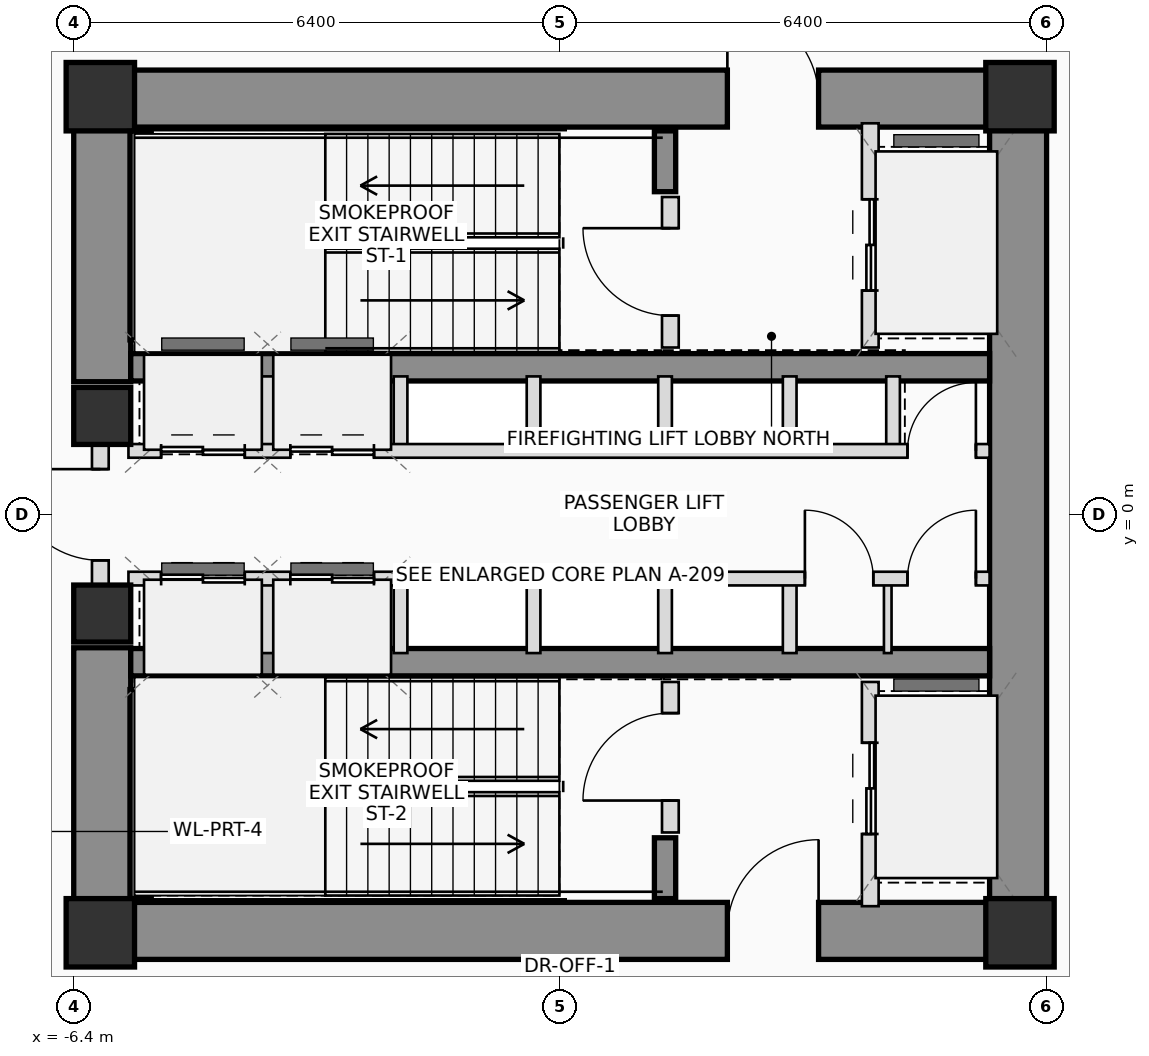
"""IFC4 building model, lengths in metres.
Left out: names, types, materials, properties, quantities, classifications, styles, units other than length and angle.
Written with IfcOpenShell. Run it as: python <this file> out.ifc"""

import sys

from ifc_helpers import new_model, si_unit, direction, frame, frame_2d, origin, origin_2d, place, context, subcontext, project, spatial, rectangle, extrude, source, transform, mapped, element, fill, save


model = new_model("IFC4")
c1 = context("Model", 3, precision=1e-05, world=origin(), true_north=direction((0.0, 1.0)))
c2 = subcontext(c1, "Body", "Model", "MODEL_VIEW")
j1 = project(units=[si_unit("LENGTHUNIT", "METRE"), si_unit("PLANEANGLEUNIT", "RADIAN")], contexts=[c1])
p1 = place(None, origin())
s1 = spatial("IfcSite", under=j1, at=p1, CompositionType="ELEMENT")
p2 = place(p1, origin())
s2 = spatial("IfcBuilding", under=s1, at=p2, CompositionType="ELEMENT")
p3 = place(p2, frame((0.0, 0.0, 97.4)))
s3 = spatial("IfcBuildingStorey", under=s2, at=p3, CompositionType="ELEMENT", Elevation=97.4)
m1 = source(origin(), c2, "Body", "SweptSolid", [
    extrude(rectangle(XDim=0.9, YDim=0.9, at=origin_2d()), origin(), (0.0, 0.0, 1.0), 3.75),
])
for number, where, z_axis, x_axis in (
    (1, (-6.05, -5.5, 0.0), (0.0, 0.0, 1.0), (1.0, 0.0, 0.0)),
    (2, (6.05, -5.5, 0.0), (0.0, 0.0, 1.0), (1.0, 0.0, 0.0)),
    (3, (6.05, 5.5, 0.0), (0.0, 0.0, 1.0), (1.0, 0.0, 0.0)),
    (4, (-6.05, 5.5, 0.0), (0.0, 0.0, 1.0), (1.0, 0.0, 0.0)),
):
    element("IfcColumn", number, at=place(p3, frame(where, z_axis=z_axis, x_axis=x_axis)), inside=s3, PredefinedType="COLUMN", context=c2, shape_type="MappedRepresentation", body=[
        mapped(m1, transform((0.0, 0.0, 0.0), scale=1.0)),
    ])
p4 = place(p3, frame((-6.4, 5.475, 0.0), z_axis=(0.0, 0.0, 1.0), x_axis=(1.0, 0.0, 0.0)))
e5 = element("IfcWall", 5, at=p4, inside=s3, PredefinedType="SHEAR", context=c2, shape_type="SweptSolid", body=[
    extrude(rectangle(XDim=12.8, YDim=0.75, at=frame_2d((6.4, 0.0))), origin(), (0.0, 0.0, 1.0), 3.75),
])
p5 = place(p4, frame((8.6, 0.0, 0.0)))
e6 = element("IfcOpeningElement", 6, at=p5, cuts=e5, PredefinedType="OPENING", context=c2, shape_type="SweptSolid", body=[
    extrude(rectangle(XDim=1.2, YDim=2.2, at=frame_2d((0.6, 1.1))), frame((0.0, 0.385, 0.0), z_axis=(0.0, -1.0, 0.0), x_axis=(1.0, 0.0, 0.0)), (0.0, 0.0, 1.0), 0.77),
])
p6 = place(p3, frame((-6.4, -5.475, 0.0), z_axis=(0.0, 0.0, 1.0), x_axis=(1.0, 0.0, 0.0)))
e7 = element("IfcWall", 7, at=p6, inside=s3, PredefinedType="SHEAR", context=c2, shape_type="SweptSolid", body=[
    extrude(rectangle(XDim=12.8, YDim=0.75, at=frame_2d((6.4, 0.0))), origin(), (0.0, 0.0, 1.0), 3.75),
])
p7 = place(p6, frame((8.6, 0.0, 0.0)))
e8 = element("IfcOpeningElement", 8, at=p7, cuts=e7, PredefinedType="OPENING", context=c2, shape_type="SweptSolid", body=[
    extrude(rectangle(XDim=1.2, YDim=2.2, at=frame_2d((0.6, 1.1))), frame((0.0, 0.385, 0.0), z_axis=(0.0, -1.0, 0.0), x_axis=(1.0, 0.0, 0.0)), (0.0, 0.0, 1.0), 0.77),
])
p8 = place(p3, frame((6.025, -5.1, 0.0), z_axis=(0.0, 0.0, 1.0), x_axis=(0.0, 1.0, 0.0)))
e9 = element("IfcWall", 9, at=p8, inside=s3, PredefinedType="SHEAR", context=c2, shape_type="SweptSolid", body=[
    extrude(rectangle(XDim=10.2, YDim=0.75, at=frame_2d((5.1, 0.0))), origin(), (0.0, 0.0, 1.0), 3.75),
])
for number, where, z_axis, x_axis in (
    (10, (-6.025, -5.1, 0.0), (0.0, 0.0, 1.0), (0.0, 1.0, 0.0)),
    (11, (-6.025, 1.75, 0.0), (0.0, 0.0, 1.0), (0.0, 1.0, 0.0)),
):
    element("IfcWall", number, at=place(p3, frame(where, z_axis=z_axis, x_axis=x_axis)), inside=s3, PredefinedType="SHEAR", context=c2, shape_type="SweptSolid", body=[
        extrude(rectangle(XDim=3.35, YDim=0.75, at=frame_2d((1.675, 0.0))), origin(), (0.0, 0.0, 1.0), 3.75),
    ])
for number, where, z_axis, x_axis in (
    (12, (-5.65, 1.94, 0.0), (0.0, 0.0, 1.0), (1.0, 0.0, 0.0)),
    (13, (-5.65, -1.94, 0.0), (0.0, 0.0, 1.0), (1.0, 0.0, 0.0)),
):
    element("IfcWall", number, at=place(p3, frame(where, z_axis=z_axis, x_axis=x_axis)), inside=s3, PredefinedType="SHEAR", context=c2, shape_type="SweptSolid", body=[
        extrude(rectangle(XDim=11.3, YDim=0.36, at=frame_2d((5.65, 0.0))), origin(), (0.0, 0.0, 1.0), 3.75),
    ])
p9 = place(p3, frame((-5.52, 2.3, 0.0), z_axis=(0.0, 0.0, 1.0), x_axis=(0.0, 1.0, 0.0)))
e14 = element("IfcWall", 14, at=p9, inside=s3, PredefinedType="SHEAR", context=c2, shape_type="SweptSolid", body=[
    extrude(rectangle(XDim=2.75, YDim=0.28, at=frame_2d((1.375, 0.0))), origin(), (0.0, 0.0, 1.0), 3.75),
])
p10 = place(p3, frame((1.38, 4.25, 0.0), z_axis=(0.0, 0.0, 1.0), x_axis=(0.0, 1.0, 0.0)))
e15 = element("IfcWall", 15, at=p10, inside=s3, PredefinedType="SHEAR", context=c2, shape_type="SweptSolid", body=[
    extrude(rectangle(XDim=0.8, YDim=0.28, at=frame_2d((0.4, 0.0))), origin(), (0.0, 0.0, 1.0), 3.75),
])
p11 = place(p3, frame((-5.52, -5.05, 0.0), z_axis=(0.0, 0.0, 1.0), x_axis=(0.0, 1.0, 0.0)))
e16 = element("IfcWall", 16, at=p11, inside=s3, PredefinedType="SHEAR", context=c2, shape_type="SweptSolid", body=[
    extrude(rectangle(XDim=2.75, YDim=0.28, at=frame_2d((1.375, 0.0))), origin(), (0.0, 0.0, 1.0), 3.75),
])
p12 = place(p3, frame((1.38, -5.05, 0.0), z_axis=(0.0, 0.0, 1.0), x_axis=(0.0, 1.0, 0.0)))
e17 = element("IfcWall", 17, at=p12, inside=s3, PredefinedType="SHEAR", context=c2, shape_type="SweptSolid", body=[
    extrude(rectangle(XDim=0.8, YDim=0.28, at=frame_2d((0.4, 0.0))), origin(), (0.0, 0.0, 1.0), 3.75),
])
m2 = source(origin(), c2, "Body", "SweptSolid", [
    extrude(rectangle(XDim=0.75, YDim=0.75, at=origin_2d()), origin(), (0.0, 0.0, 1.0), 3.75),
])
for number, where, z_axis, x_axis in (
    (18, (-6.025, -1.3, 0.0), (0.0, 0.0, 1.0), (1.0, 0.0, 0.0)),
    (19, (-6.025, 1.3, 0.0), (0.0, 0.0, 1.0), (1.0, 0.0, 0.0)),
):
    element("IfcColumn", number, at=place(p3, frame(where, z_axis=z_axis, x_axis=x_axis)), inside=s3, PredefinedType="COLUMN", context=c2, shape_type="MappedRepresentation", body=[
        mapped(m2, transform((0.0, 0.0, 0.0), scale=1.0)),
    ])
p13 = place(p3, frame((-6.05, -0.95, 0.0), z_axis=(0.0, 0.0, 1.0), x_axis=(0.0, 1.0, 0.0)))
e20 = element("IfcWall", 20, at=p13, inside=s3, PredefinedType="PLUMBINGWALL", context=c2, shape_type="SweptSolid", body=[
    extrude(rectangle(XDim=1.9, YDim=0.22, at=frame_2d((0.95, 0.0))), origin(), (0.0, 0.0, 1.0), 2.525),
])
p14 = place(p13, frame((0.35, 0.0, 0.0)))
e21 = element("IfcOpeningElement", 21, at=p14, cuts=e20, PredefinedType="OPENING", context=c2, shape_type="SweptSolid", body=[
    extrude(rectangle(XDim=1.2, YDim=2.2, at=frame_2d((0.6, 1.1))), frame((0.0, 0.12, 0.0), z_axis=(0.0, -1.0, 0.0), x_axis=(1.0, 0.0, 0.0)), (0.0, 0.0, 1.0), 0.24),
])
p15 = place(p3, frame((1.45, 2.2, 0.0), z_axis=(0.0, 0.0, 1.0), x_axis=(0.0, 1.0, 0.0)))
e22 = element("IfcWall", 22, at=p15, inside=s3, PredefinedType="PLUMBINGWALL", context=c2, shape_type="SweptSolid", body=[
    extrude(rectangle(XDim=1.98, YDim=0.22, at=frame_2d((0.99, 0.0))), origin(), (0.0, 0.0, 1.0), 3.545),
])
p16 = place(p15, frame((0.42, 0.0, 0.0)))
e23 = element("IfcOpeningElement", 23, at=p16, cuts=e22, PredefinedType="OPENING", context=c2, shape_type="SweptSolid", body=[
    extrude(rectangle(XDim=1.15, YDim=2.15, at=frame_2d((0.575, 1.075))), frame((0.0, 0.12, 0.0), z_axis=(0.0, -1.0, 0.0), x_axis=(1.0, 0.0, 0.0)), (0.0, 0.0, 1.0), 0.24),
])
p17 = place(p3, frame((4.08, 2.2, 0.0), z_axis=(0.0, 0.0, 1.0), x_axis=(0.0, 1.0, 0.0)))
e24 = element("IfcWall", 24, at=p17, inside=s3, PredefinedType="PLUMBINGWALL", context=c2, shape_type="SweptSolid", body=[
    extrude(rectangle(XDim=2.95, YDim=0.22, at=frame_2d((1.475, 0.0))), origin(), (0.0, 0.0, 1.0), 3.545),
])
p18 = place(p17, frame((0.75, 0.0, 0.0)))
e25 = element("IfcOpeningElement", 25, at=p18, cuts=e24, PredefinedType="OPENING", context=c2, shape_type="SweptSolid", body=[
    extrude(rectangle(XDim=1.2, YDim=2.25, at=frame_2d((0.6, 1.125))), frame((0.0, 0.12, 0.0), z_axis=(0.0, -1.0, 0.0), x_axis=(1.0, 0.0, 0.0)), (0.0, 0.0, 1.0), 0.24),
])
p19 = place(p3, frame((1.45, -4.18, 0.0), z_axis=(0.0, 0.0, 1.0), x_axis=(0.0, 1.0, 0.0)))
e26 = element("IfcWall", 26, at=p19, inside=s3, PredefinedType="PLUMBINGWALL", context=c2, shape_type="SweptSolid", body=[
    extrude(rectangle(XDim=1.98, YDim=0.22, at=frame_2d((0.99, 0.0))), origin(), (0.0, 0.0, 1.0), 3.545),
])
p20 = place(p19, frame((0.42, 0.0, 0.0)))
e27 = element("IfcOpeningElement", 27, at=p20, cuts=e26, PredefinedType="OPENING", context=c2, shape_type="SweptSolid", body=[
    extrude(rectangle(XDim=1.15, YDim=2.15, at=frame_2d((0.575, 1.075))), frame((0.0, 0.12, 0.0), z_axis=(0.0, -1.0, 0.0), x_axis=(1.0, 0.0, 0.0)), (0.0, 0.0, 1.0), 0.24),
])
p21 = place(p3, frame((4.08, -5.15, 0.0), z_axis=(0.0, 0.0, 1.0), x_axis=(0.0, 1.0, 0.0)))
e28 = element("IfcWall", 28, at=p21, inside=s3, PredefinedType="PLUMBINGWALL", context=c2, shape_type="SweptSolid", body=[
    extrude(rectangle(XDim=2.95, YDim=0.22, at=frame_2d((1.475, 0.0))), origin(), (0.0, 0.0, 1.0), 3.545),
])
p22 = place(p21, frame((0.95, 0.0, 0.0)))
e29 = element("IfcOpeningElement", 29, at=p22, cuts=e28, PredefinedType="OPENING", context=c2, shape_type="SweptSolid", body=[
    extrude(rectangle(XDim=1.2, YDim=2.25, at=frame_2d((0.6, 1.125))), frame((0.0, 0.12, 0.0), z_axis=(0.0, -1.0, 0.0), x_axis=(1.0, 0.0, 0.0)), (0.0, 0.0, 1.0), 0.24),
])
for number, where, z_axis, x_axis in (
    (30, (-3.85, 0.84, 0.0), (0.0, 0.0, 1.0), (0.0, 1.0, 0.0)),
    (31, (-3.85, -1.82, 0.0), (0.0, 0.0, 1.0), (0.0, 1.0, 0.0)),
    (32, (-2.1, 0.84, 0.0), (0.0, 0.0, 1.0), (0.0, 1.0, 0.0)),
    (33, (-2.1, -1.82, 0.0), (0.0, 0.0, 1.0), (0.0, 1.0, 0.0)),
    (34, (-0.35, 0.84, 0.0), (0.0, 0.0, 1.0), (0.0, 1.0, 0.0)),
    (35, (-0.35, -1.82, 0.0), (0.0, 0.0, 1.0), (0.0, 1.0, 0.0)),
    (36, (1.38, 0.84, 0.0), (0.0, 0.0, 1.0), (0.0, 1.0, 0.0)),
    (37, (1.38, -1.82, 0.0), (0.0, 0.0, 1.0), (0.0, 1.0, 0.0)),
    (38, (3.02, 0.84, 0.0), (0.0, 0.0, 1.0), (0.0, 1.0, 0.0)),
    (39, (4.38, 0.84, 0.0), (0.0, 0.0, 1.0), (0.0, 1.0, 0.0)),
    (40, (3.02, -1.82, 0.0), (0.0, 0.0, 1.0), (0.0, 1.0, 0.0)),
):
    element("IfcWall", number, at=place(p3, frame(where, z_axis=z_axis, x_axis=x_axis)), inside=s3, PredefinedType="PLUMBINGWALL", context=c2, shape_type="SweptSolid", body=[
        extrude(rectangle(XDim=0.98, YDim=0.18, at=frame_2d((0.49, 0.0))), origin(), (0.0, 0.0, 1.0), 3.545),
    ])
p23 = place(p3, frame((4.31, -1.82, 0.0), z_axis=(0.0, 0.0, 1.0), x_axis=(0.0, 1.0, 0.0)))
e41 = element("IfcWall", 41, at=p23, inside=s3, PredefinedType="PARTITIONING", context=c2, shape_type="SweptSolid", body=[
    extrude(rectangle(XDim=0.98, YDim=0.1, at=frame_2d((0.49, 0.0))), origin(), (0.0, 0.0, 1.0), 3.545),
])
p24 = place(p3, frame((-5.68, 0.84, 0.0), z_axis=(0.0, 0.0, 1.0), x_axis=(1.0, 0.0, 0.0)))
e42 = element("IfcWall", 42, at=p24, inside=s3, PredefinedType="PLUMBINGWALL", context=c2, shape_type="SweptSolid", body=[
    extrude(rectangle(XDim=11.33, YDim=0.18, at=frame_2d((5.665, 0.0))), origin(), (0.0, 0.0, 1.0), 3.545),
])
p25 = place(p24, frame((0.43, 0.0, 0.0)))
e43 = element("IfcOpeningElement", 43, at=p25, cuts=e42, PredefinedType="OPENING", context=c2, shape_type="SweptSolid", body=[
    extrude(rectangle(XDim=1.1, YDim=2.2, at=frame_2d((0.55, 1.1))), frame((0.0, 0.1, 0.0), z_axis=(0.0, -1.0, 0.0), x_axis=(1.0, 0.0, 0.0)), (0.0, 0.0, 1.0), 0.2),
])
p26 = place(p24, frame((2.13, 0.0, 0.0)))
e44 = element("IfcOpeningElement", 44, at=p26, cuts=e42, PredefinedType="OPENING", context=c2, shape_type="SweptSolid", body=[
    extrude(rectangle(XDim=1.1, YDim=2.2, at=frame_2d((0.55, 1.1))), frame((0.0, 0.1, 0.0), z_axis=(0.0, -1.0, 0.0), x_axis=(1.0, 0.0, 0.0)), (0.0, 0.0, 1.0), 0.2),
])
p27 = place(p24, frame((10.25, 0.0, 0.0)))
e45 = element("IfcOpeningElement", 45, at=p27, cuts=e42, PredefinedType="OPENING", context=c2, shape_type="SweptSolid", body=[
    extrude(rectangle(XDim=0.9, YDim=2.05, at=frame_2d((0.45, 1.025))), frame((0.0, 0.1, 0.0), z_axis=(0.0, -1.0, 0.0), x_axis=(1.0, 0.0, 0.0)), (0.0, 0.0, 1.0), 0.2),
])
p28 = place(p3, frame((-5.68, -0.84, 0.0), z_axis=(0.0, 0.0, 1.0), x_axis=(1.0, 0.0, 0.0)))
e46 = element("IfcWall", 46, at=p28, inside=s3, PredefinedType="PLUMBINGWALL", context=c2, shape_type="SweptSolid", body=[
    extrude(rectangle(XDim=11.33, YDim=0.18, at=frame_2d((5.665, 0.0))), origin(), (0.0, 0.0, 1.0), 3.545),
])
p29 = place(p28, frame((0.43, 0.0, 0.0)))
e47 = element("IfcOpeningElement", 47, at=p29, cuts=e46, PredefinedType="OPENING", context=c2, shape_type="SweptSolid", body=[
    extrude(rectangle(XDim=1.1, YDim=2.2, at=frame_2d((0.55, 1.1))), frame((0.0, 0.1, 0.0), z_axis=(0.0, -1.0, 0.0), x_axis=(1.0, 0.0, 0.0)), (0.0, 0.0, 1.0), 0.2),
])
p30 = place(p28, frame((2.13, 0.0, 0.0)))
e48 = element("IfcOpeningElement", 48, at=p30, cuts=e46, PredefinedType="OPENING", context=c2, shape_type="SweptSolid", body=[
    extrude(rectangle(XDim=1.1, YDim=2.2, at=frame_2d((0.55, 1.1))), frame((0.0, 0.1, 0.0), z_axis=(0.0, -1.0, 0.0), x_axis=(1.0, 0.0, 0.0)), (0.0, 0.0, 1.0), 0.2),
])
p31 = place(p28, frame((8.9, 0.0, 0.0)))
e49 = element("IfcOpeningElement", 49, at=p31, cuts=e46, PredefinedType="OPENING", context=c2, shape_type="SweptSolid", body=[
    extrude(rectangle(XDim=0.9, YDim=2.05, at=frame_2d((0.45, 1.025))), frame((0.0, 0.1, 0.0), z_axis=(0.0, -1.0, 0.0), x_axis=(1.0, 0.0, 0.0)), (0.0, 0.0, 1.0), 0.2),
])
p32 = place(p28, frame((10.25, 0.0, 0.0)))
e50 = element("IfcOpeningElement", 50, at=p32, cuts=e46, PredefinedType="OPENING", context=c2, shape_type="SweptSolid", body=[
    extrude(rectangle(XDim=0.9, YDim=2.05, at=frame_2d((0.45, 1.025))), frame((0.0, 0.1, 0.0), z_axis=(0.0, -1.0, 0.0), x_axis=(1.0, 0.0, 0.0)), (0.0, 0.0, 1.0), 0.2),
])
p33 = place(p5, origin())
e51 = element("IfcDoor", 51, at=p33, inside=s3, OperationType="SINGLE_SWING_LEFT", PredefinedType="DOOR", context=c2, shape_type="SweptSolid", body=[
    extrude(rectangle(XDim=1.2, YDim=2.2, at=frame_2d((0.6, 1.1))), frame((0.0, 0.025, 0.0), z_axis=(0.0, -1.0, 0.0), x_axis=(1.0, 0.0, 0.0)), (0.0, 0.0, 1.0), 0.05),
])
fill(e6, e51)
p34 = place(p7, origin())
e52 = element("IfcDoor", 52, at=p34, inside=s3, OperationType="SINGLE_SWING_RIGHT", PredefinedType="DOOR", context=c2, shape_type="SweptSolid", body=[
    extrude(rectangle(XDim=1.2, YDim=2.2, at=frame_2d((0.6, 1.1))), frame((0.0, 0.025, 0.0), z_axis=(0.0, -1.0, 0.0), x_axis=(1.0, 0.0, 0.0)), (0.0, 0.0, 1.0), 0.05),
])
fill(e8, e52)
p35 = place(p14, origin())
e53 = element("IfcDoor", 53, at=p35, inside=s3, OperationType="SINGLE_SWING_RIGHT", PredefinedType="DOOR", context=c2, shape_type="SweptSolid", body=[
    extrude(rectangle(XDim=1.2, YDim=2.2, at=frame_2d((0.6, 1.1))), frame((0.0, 0.025, 0.0), z_axis=(0.0, -1.0, 0.0), x_axis=(1.0, 0.0, 0.0)), (0.0, 0.0, 1.0), 0.05),
])
fill(e21, e53)
p36 = place(p16, origin())
e54 = element("IfcDoor", 54, at=p36, inside=s3, OperationType="SINGLE_SWING_RIGHT", PredefinedType="DOOR", context=c2, shape_type="SweptSolid", body=[
    extrude(rectangle(XDim=1.15, YDim=2.15, at=frame_2d((0.575, 1.075))), frame((0.0, 0.025, 0.0), z_axis=(0.0, -1.0, 0.0), x_axis=(1.0, 0.0, 0.0)), (0.0, 0.0, 1.0), 0.05),
])
fill(e23, e54)
p37 = place(p18, origin())
e55 = element("IfcDoor", 55, at=p37, inside=s3, OperationType="DOUBLE_DOOR_SLIDING", PredefinedType="DOOR", context=c2, shape_type="SweptSolid", body=[
    extrude(rectangle(XDim=1.2, YDim=2.25, at=frame_2d((0.6, 1.125))), frame((0.0, 0.025, 0.0), z_axis=(0.0, -1.0, 0.0), x_axis=(1.0, 0.0, 0.0)), (0.0, 0.0, 1.0), 0.05),
])
fill(e25, e55)
p38 = place(p20, origin())
e56 = element("IfcDoor", 56, at=p38, inside=s3, OperationType="SINGLE_SWING_LEFT", PredefinedType="DOOR", context=c2, shape_type="SweptSolid", body=[
    extrude(rectangle(XDim=1.15, YDim=2.15, at=frame_2d((0.575, 1.075))), frame((0.0, 0.025, 0.0), z_axis=(0.0, -1.0, 0.0), x_axis=(1.0, 0.0, 0.0)), (0.0, 0.0, 1.0), 0.05),
])
fill(e27, e56)
p39 = place(p22, origin())
e57 = element("IfcDoor", 57, at=p39, inside=s3, OperationType="DOUBLE_DOOR_SLIDING", PredefinedType="DOOR", context=c2, shape_type="SweptSolid", body=[
    extrude(rectangle(XDim=1.2, YDim=2.25, at=frame_2d((0.6, 1.125))), frame((0.0, 0.025, 0.0), z_axis=(0.0, -1.0, 0.0), x_axis=(1.0, 0.0, 0.0)), (0.0, 0.0, 1.0), 0.05),
])
fill(e29, e57)
p40 = place(p25, origin())
e58 = element("IfcDoor", 58, at=p40, inside=s3, OperationType="DOUBLE_DOOR_SLIDING", PredefinedType="DOOR", context=c2, shape_type="SweptSolid", body=[
    extrude(rectangle(XDim=1.1, YDim=2.2, at=frame_2d((0.55, 1.1))), frame((0.0, 0.025, 0.0), z_axis=(0.0, -1.0, 0.0), x_axis=(1.0, 0.0, 0.0)), (0.0, 0.0, 1.0), 0.05),
])
fill(e43, e58)
p41 = place(p26, origin())
e59 = element("IfcDoor", 59, at=p41, inside=s3, OperationType="DOUBLE_DOOR_SLIDING", PredefinedType="DOOR", context=c2, shape_type="SweptSolid", body=[
    extrude(rectangle(XDim=1.1, YDim=2.2, at=frame_2d((0.55, 1.1))), frame((0.0, 0.025, 0.0), z_axis=(0.0, -1.0, 0.0), x_axis=(1.0, 0.0, 0.0)), (0.0, 0.0, 1.0), 0.05),
])
fill(e44, e59)
p42 = place(p27, origin())
e60 = element("IfcDoor", 60, at=p42, inside=s3, OperationType="SINGLE_SWING_RIGHT", PredefinedType="DOOR", context=c2, shape_type="SweptSolid", body=[
    extrude(rectangle(XDim=0.9, YDim=2.05, at=frame_2d((0.45, 1.025))), frame((0.0, 0.025, 0.0), z_axis=(0.0, -1.0, 0.0), x_axis=(1.0, 0.0, 0.0)), (0.0, 0.0, 1.0), 0.05),
])
fill(e45, e60)
p43 = place(p29, origin())
e61 = element("IfcDoor", 61, at=p43, inside=s3, OperationType="DOUBLE_DOOR_SLIDING", PredefinedType="DOOR", context=c2, shape_type="SweptSolid", body=[
    extrude(rectangle(XDim=1.1, YDim=2.2, at=frame_2d((0.55, 1.1))), frame((0.0, 0.025, 0.0), z_axis=(0.0, -1.0, 0.0), x_axis=(1.0, 0.0, 0.0)), (0.0, 0.0, 1.0), 0.05),
])
fill(e47, e61)
p44 = place(p30, origin())
e62 = element("IfcDoor", 62, at=p44, inside=s3, OperationType="DOUBLE_DOOR_SLIDING", PredefinedType="DOOR", context=c2, shape_type="SweptSolid", body=[
    extrude(rectangle(XDim=1.1, YDim=2.2, at=frame_2d((0.55, 1.1))), frame((0.0, 0.025, 0.0), z_axis=(0.0, -1.0, 0.0), x_axis=(1.0, 0.0, 0.0)), (0.0, 0.0, 1.0), 0.05),
])
fill(e48, e62)
p45 = place(p31, origin())
e63 = element("IfcDoor", 63, at=p45, inside=s3, OperationType="SINGLE_SWING_LEFT", PredefinedType="DOOR", context=c2, shape_type="SweptSolid", body=[
    extrude(rectangle(XDim=0.9, YDim=2.05, at=frame_2d((0.45, 1.025))), frame((0.0, 0.025, 0.0), z_axis=(0.0, -1.0, 0.0), x_axis=(1.0, 0.0, 0.0)), (0.0, 0.0, 1.0), 0.05),
])
fill(e49, e63)
p46 = place(p32, origin())
e64 = element("IfcDoor", 64, at=p46, inside=s3, OperationType="SINGLE_SWING_RIGHT", PredefinedType="DOOR", context=c2, shape_type="SweptSolid", body=[
    extrude(rectangle(XDim=0.9, YDim=2.05, at=frame_2d((0.45, 1.025))), frame((0.0, 0.025, 0.0), z_axis=(0.0, -1.0, 0.0), x_axis=(1.0, 0.0, 0.0)), (0.0, 0.0, 1.0), 0.05),
])
fill(e50, e64)
save(model, sys.argv[1])
